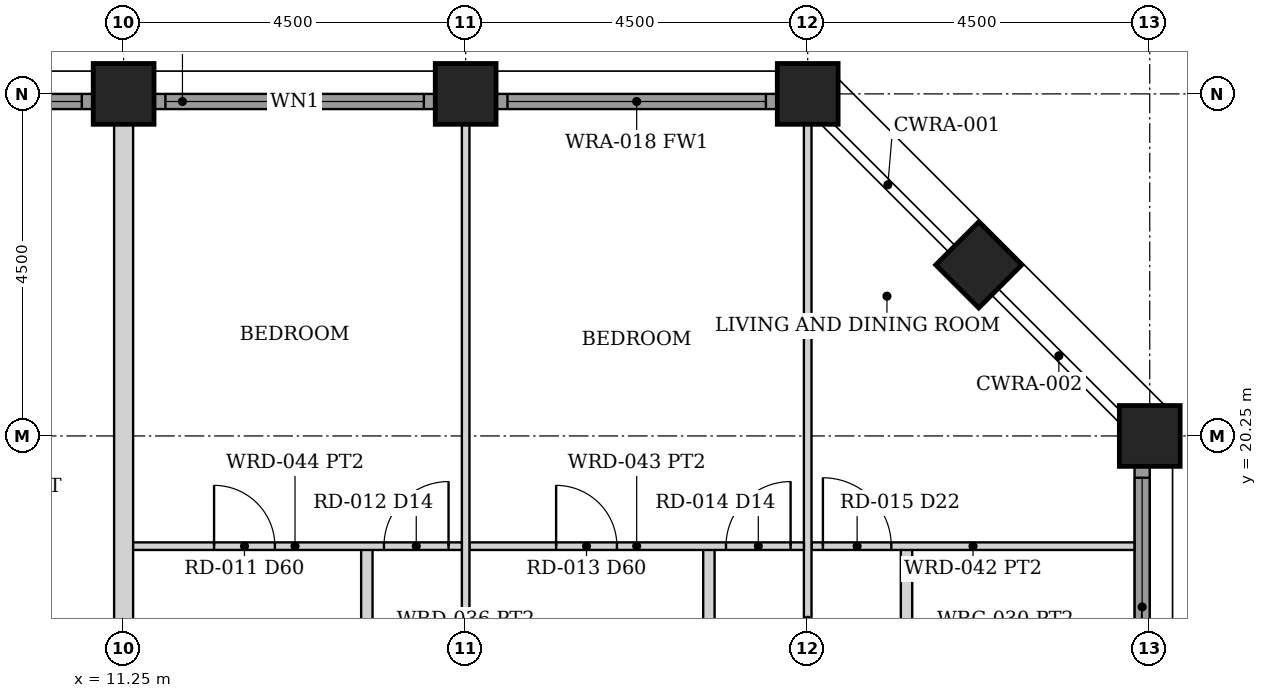
"""IFC4 building model, lengths in metres.
Left out: names, types, materials, properties, quantities, classifications, styles, units other than length and angle.
Written with IfcOpenShell. Run it as: python <this file> out.ifc"""

import sys

from ifc_helpers import new_model, si_unit, direction, frame, frame_2d, origin, origin_2d, place, context, subcontext, project, spatial, rectangle, hollow_rectangle, extrude, element, fill, save


model = new_model("IFC4")
c1 = context("Model", 3, precision=1e-05, world=origin(), true_north=direction((0.0, 1.0)))
c2 = subcontext(c1, "Body", "Model", "MODEL_VIEW")
j1 = project(units=[si_unit("LENGTHUNIT", "METRE"), si_unit("PLANEANGLEUNIT", "RADIAN")], contexts=[c1])
p1 = place(None, origin())
s1 = spatial("IfcSite", under=j1, at=p1, CompositionType="ELEMENT")
p2 = place(p1, origin())
s2 = spatial("IfcBuilding", under=s1, at=p2, CompositionType="ELEMENT")
p3 = place(p2, frame((0.0, 0.0, 58.0)))
s3 = spatial("IfcBuildingStorey", under=s2, at=p3, CompositionType="ELEMENT", Elevation=58.0)
for number, where, z_axis, x_axis in (
    (1, (11.25, 24.75, 0.0), (0.0, 0.0, 1.0), (0.0, 1.0, 0.0)),
    (2, (15.75, 24.75, 0.0), (0.0, 0.0, 1.0), (0.0, 1.0, 0.0)),
    (3, (20.25, 24.75, 0.0), (0.0, 0.0, 1.0), (0.0, 1.0, 0.0)),
    (4, (24.75, 20.25, 0.0), (0.0, 0.0, 1.0), (1.0, 0.0, 0.0)),
    (5, (22.5, 22.5, 0.0), (0.0, 0.0, 1.0), (0.707, 0.707, 0.0)),
):
    element("IfcColumn", number, at=place(p3, frame(where, z_axis=z_axis, x_axis=x_axis)), inside=s3, PredefinedType="COLUMN", context=c2, shape_type="SweptSolid", body=[
        extrude(hollow_rectangle(XDim=0.8, YDim=0.8, WallThickness=0.06, at=origin_2d()), origin(), (0.0, 0.0, 1.0), 3.5),
    ])
p4 = place(p3, frame((24.65, 16.155, 0.0), z_axis=(0.0, 0.0, 1.0), x_axis=(0.0, 1.0, 0.0)))
e6 = element("IfcWall", 6, at=p4, inside=s3, PredefinedType="SOLIDWALL", context=c2, shape_type="SweptSolid", body=[
    extrude(rectangle(XDim=3.69, YDim=0.2, at=frame_2d((1.845, 0.0))), origin(), (0.0, 0.0, 1.0), 2.379),
])
p5 = place(p4, frame((0.145, 0.0, 0.3)))
e7 = element("IfcOpeningElement", 7, at=p5, cuts=e6, PredefinedType="OPENING", context=c2, shape_type="SweptSolid", body=[
    extrude(rectangle(XDim=3.4, YDim=1.929, at=frame_2d((1.7, 0.964))), frame((0.0, 0.11, 0.0), z_axis=(0.0, -1.0, 0.0), x_axis=(1.0, 0.0, 0.0)), (0.0, 0.0, 1.0), 0.22),
])
p6 = place(p3, frame((7.155, 24.65, 0.0), z_axis=(0.0, 0.0, 1.0), x_axis=(1.0, 0.0, 0.0)))
e8 = element("IfcWall", 8, at=p6, inside=s3, PredefinedType="SOLIDWALL", context=c2, shape_type="SweptSolid", body=[
    extrude(rectangle(XDim=3.69, YDim=0.2, at=frame_2d((1.845, 0.0))), origin(), (0.0, 0.0, 1.0), 2.379),
])
p7 = place(p6, frame((0.145, 0.0, 0.3)))
e9 = element("IfcOpeningElement", 9, at=p7, cuts=e8, PredefinedType="OPENING", context=c2, shape_type="SweptSolid", body=[
    extrude(rectangle(XDim=3.4, YDim=1.929, at=frame_2d((1.7, 0.964))), frame((0.0, 0.11, 0.0), z_axis=(0.0, -1.0, 0.0), x_axis=(1.0, 0.0, 0.0)), (0.0, 0.0, 1.0), 0.22),
])
p8 = place(p3, frame((11.655, 24.65, 0.0), z_axis=(0.0, 0.0, 1.0), x_axis=(1.0, 0.0, 0.0)))
e10 = element("IfcWall", 10, at=p8, inside=s3, PredefinedType="SOLIDWALL", context=c2, shape_type="SweptSolid", body=[
    extrude(rectangle(XDim=3.69, YDim=0.2, at=frame_2d((1.845, 0.0))), origin(), (0.0, 0.0, 1.0), 2.379),
])
p9 = place(p8, frame((0.145, 0.0, 0.3)))
e11 = element("IfcOpeningElement", 11, at=p9, cuts=e10, PredefinedType="OPENING", context=c2, shape_type="SweptSolid", body=[
    extrude(rectangle(XDim=3.4, YDim=1.929, at=frame_2d((1.7, 0.964))), frame((0.0, 0.11, 0.0), z_axis=(0.0, -1.0, 0.0), x_axis=(1.0, 0.0, 0.0)), (0.0, 0.0, 1.0), 0.22),
])
p10 = place(p3, frame((16.155, 24.65, 0.0), z_axis=(0.0, 0.0, 1.0), x_axis=(1.0, 0.0, 0.0)))
e12 = element("IfcWall", 12, at=p10, inside=s3, PredefinedType="SOLIDWALL", context=c2, shape_type="SweptSolid", body=[
    extrude(rectangle(XDim=3.69, YDim=0.2, at=frame_2d((1.845, 0.0))), origin(), (0.0, 0.0, 1.0), 2.379),
])
p11 = place(p10, frame((0.145, 0.0, 0.3)))
e13 = element("IfcOpeningElement", 13, at=p11, cuts=e12, PredefinedType="OPENING", context=c2, shape_type="SweptSolid", body=[
    extrude(rectangle(XDim=3.4, YDim=1.929, at=frame_2d((1.7, 0.964))), frame((0.0, 0.11, 0.0), z_axis=(0.0, -1.0, 0.0), x_axis=(1.0, 0.0, 0.0)), (0.0, 0.0, 1.0), 0.22),
])
p12 = place(p3, frame((21.55, 11.3, 0.0), z_axis=(0.0, 0.0, 1.0), x_axis=(0.0, 1.0, 0.0)))
e14 = element("IfcWall", 14, at=p12, inside=s3, PredefinedType="PARTITIONING", context=c2, shape_type="SweptSolid", body=[
    extrude(rectangle(XDim=7.5, YDim=0.15, at=frame_2d((3.75, 0.0))), origin(), (0.0, 0.0, 1.0), 2.373),
])
p13 = place(p12, frame((3.3, 0.0, 0.0)))
e15 = element("IfcOpeningElement", 15, at=p13, cuts=e14, PredefinedType="OPENING", context=c2, shape_type="SweptSolid", body=[
    extrude(rectangle(XDim=0.9, YDim=2.1, at=frame_2d((0.45, 1.05))), frame((0.0, 0.085, 0.0), z_axis=(0.0, -1.0, 0.0), x_axis=(1.0, 0.0, 0.0)), (0.0, 0.0, 1.0), 0.17),
])
p14 = place(p3, frame((20.3, 18.8, 0.0), z_axis=(0.0, 0.0, 1.0), x_axis=(1.0, 0.0, 0.0)))
e16 = element("IfcWall", 16, at=p14, inside=s3, PredefinedType="PARTITIONING", context=c2, shape_type="SweptSolid", body=[
    extrude(rectangle(XDim=4.25, YDim=0.1, at=frame_2d((2.125, 0.0))), origin(), (0.0, 0.0, 1.0), 2.373),
])
p15 = place(p14, frame((0.15, 0.0, 0.0)))
e17 = element("IfcOpeningElement", 17, at=p15, cuts=e16, PredefinedType="OPENING", context=c2, shape_type="SweptSolid", body=[
    extrude(rectangle(XDim=0.9, YDim=2.1, at=frame_2d((0.45, 1.05))), frame((0.0, 0.06, 0.0), z_axis=(0.0, -1.0, 0.0), x_axis=(1.0, 0.0, 0.0)), (0.0, 0.0, 1.0), 0.12),
])
p16 = place(p3, frame((20.25, 11.3, 0.0), z_axis=(0.0, 0.0, 1.0), x_axis=(0.0, 1.0, 0.0)))
e18 = element("IfcWall", 18, at=p16, inside=s3, PredefinedType="PARTITIONING", context=c2, shape_type="SweptSolid", body=[
    extrude(rectangle(XDim=13.05, YDim=0.1, at=frame_2d((6.525, 0.0))), origin(), (0.0, 0.0, 1.0), 2.373),
])
p17 = place(p3, frame((18.95, 11.3, 0.0), z_axis=(0.0, 0.0, 1.0), x_axis=(0.0, 1.0, 0.0)))
e19 = element("IfcWall", 19, at=p17, inside=s3, PredefinedType="PARTITIONING", context=c2, shape_type="SweptSolid", body=[
    extrude(rectangle(XDim=7.5, YDim=0.15, at=frame_2d((3.75, 0.0))), origin(), (0.0, 0.0, 1.0), 2.373),
])
p18 = place(p17, frame((0.85, 0.0, 0.0)))
e20 = element("IfcOpeningElement", 20, at=p18, cuts=e19, PredefinedType="OPENING", context=c2, shape_type="SweptSolid", body=[
    extrude(rectangle(XDim=0.9, YDim=2.1, at=frame_2d((0.45, 1.05))), frame((0.0, 0.085, 0.0), z_axis=(0.0, -1.0, 0.0), x_axis=(1.0, 0.0, 0.0)), (0.0, 0.0, 1.0), 0.17),
])
p19 = place(p3, frame((15.8, 18.8, 0.0), z_axis=(0.0, 0.0, 1.0), x_axis=(1.0, 0.0, 0.0)))
e21 = element("IfcWall", 21, at=p19, inside=s3, PredefinedType="PARTITIONING", context=c2, shape_type="SweptSolid", body=[
    extrude(rectangle(XDim=4.4, YDim=0.1, at=frame_2d((2.2, 0.0))), origin(), (0.0, 0.0, 1.0), 2.373),
])
p20 = place(p19, frame((3.375, 0.0, 0.0)))
e22 = element("IfcOpeningElement", 22, at=p20, cuts=e21, PredefinedType="OPENING", context=c2, shape_type="SweptSolid", body=[
    extrude(rectangle(XDim=0.85, YDim=2.1, at=frame_2d((0.425, 1.05))), frame((0.0, 0.06, 0.0), z_axis=(0.0, -1.0, 0.0), x_axis=(1.0, 0.0, 0.0)), (0.0, 0.0, 1.0), 0.12),
])
p21 = place(p19, frame((1.14, 0.0, 0.0)))
e23 = element("IfcOpeningElement", 23, at=p21, cuts=e21, PredefinedType="OPENING", context=c2, shape_type="SweptSolid", body=[
    extrude(rectangle(XDim=0.8, YDim=2.1, at=frame_2d((0.4, 1.05))), frame((0.0, 0.06, 0.0), z_axis=(0.0, -1.0, 0.0), x_axis=(1.0, 0.0, 0.0)), (0.0, 0.0, 1.0), 0.12),
])
p22 = place(p3, frame((15.75, 11.3, 0.0), z_axis=(0.0, 0.0, 1.0), x_axis=(0.0, 1.0, 0.0)))
e24 = element("IfcWall", 24, at=p22, inside=s3, PredefinedType="PARTITIONING", context=c2, shape_type="SweptSolid", body=[
    extrude(rectangle(XDim=13.05, YDim=0.1, at=frame_2d((6.525, 0.0))), origin(), (0.0, 0.0, 1.0), 2.373),
])
p23 = place(p3, frame((14.45, 11.3, 0.0), z_axis=(0.0, 0.0, 1.0), x_axis=(0.0, 1.0, 0.0)))
e25 = element("IfcWall", 25, at=p23, inside=s3, PredefinedType="PARTITIONING", context=c2, shape_type="SweptSolid", body=[
    extrude(rectangle(XDim=7.5, YDim=0.15, at=frame_2d((3.75, 0.0))), origin(), (0.0, 0.0, 1.0), 2.373),
])
p24 = place(p23, frame((0.85, 0.0, 0.0)))
e26 = element("IfcOpeningElement", 26, at=p24, cuts=e25, PredefinedType="OPENING", context=c2, shape_type="SweptSolid", body=[
    extrude(rectangle(XDim=0.9, YDim=2.1, at=frame_2d((0.45, 1.05))), frame((0.0, 0.085, 0.0), z_axis=(0.0, -1.0, 0.0), x_axis=(1.0, 0.0, 0.0)), (0.0, 0.0, 1.0), 0.17),
])
p25 = place(p3, frame((11.31, 18.8, 0.0), z_axis=(0.0, 0.0, 1.0), x_axis=(1.0, 0.0, 0.0)))
e27 = element("IfcWall", 27, at=p25, inside=s3, PredefinedType="PARTITIONING", context=c2, shape_type="SweptSolid", body=[
    extrude(rectangle(XDim=4.39, YDim=0.1, at=frame_2d((2.195, 0.0))), origin(), (0.0, 0.0, 1.0), 2.373),
])
p26 = place(p25, frame((3.365, 0.0, 0.0)))
e28 = element("IfcOpeningElement", 28, at=p26, cuts=e27, PredefinedType="OPENING", context=c2, shape_type="SweptSolid", body=[
    extrude(rectangle(XDim=0.85, YDim=2.1, at=frame_2d((0.425, 1.05))), frame((0.0, 0.06, 0.0), z_axis=(0.0, -1.0, 0.0), x_axis=(1.0, 0.0, 0.0)), (0.0, 0.0, 1.0), 0.12),
])
p27 = place(p25, frame((1.13, 0.0, 0.0)))
e29 = element("IfcOpeningElement", 29, at=p27, cuts=e27, PredefinedType="OPENING", context=c2, shape_type="SweptSolid", body=[
    extrude(rectangle(XDim=0.8, YDim=2.1, at=frame_2d((0.4, 1.05))), frame((0.0, 0.06, 0.0), z_axis=(0.0, -1.0, 0.0), x_axis=(1.0, 0.0, 0.0)), (0.0, 0.0, 1.0), 0.12),
])
p28 = place(p3, frame((11.25, 9.2, 0.0), z_axis=(0.0, 0.0, 1.0), x_axis=(0.0, 1.0, 0.0)))
e30 = element("IfcWall", 30, at=p28, inside=s3, PredefinedType="PARTITIONING", context=c2, shape_type="SweptSolid", body=[
    extrude(rectangle(XDim=15.15, YDim=0.25, at=frame_2d((7.575, 0.0))), origin(), (0.0, 0.0, 1.0), 2.373),
])
p29 = place(p5, origin())
e31 = element("IfcWindow", 31, at=p29, inside=s3, PartitioningType="SINGLE_PANEL", PredefinedType="WINDOW", context=c2, shape_type="SweptSolid", body=[
    extrude(rectangle(XDim=3.4, YDim=1.929, at=frame_2d((1.7, 0.964))), frame((0.0, 0.03, 0.0), z_axis=(0.0, -1.0, 0.0), x_axis=(1.0, 0.0, 0.0)), (0.0, 0.0, 1.0), 0.06),
])
fill(e7, e31)
p30 = place(p7, origin())
e32 = element("IfcWindow", 32, at=p30, inside=s3, PartitioningType="SINGLE_PANEL", PredefinedType="WINDOW", context=c2, shape_type="SweptSolid", body=[
    extrude(rectangle(XDim=3.4, YDim=1.929, at=frame_2d((1.7, 0.964))), frame((0.0, 0.03, 0.0), z_axis=(0.0, -1.0, 0.0), x_axis=(1.0, 0.0, 0.0)), (0.0, 0.0, 1.0), 0.06),
])
fill(e9, e32)
p31 = place(p9, origin())
e33 = element("IfcWindow", 33, at=p31, inside=s3, PartitioningType="SINGLE_PANEL", PredefinedType="WINDOW", context=c2, shape_type="SweptSolid", body=[
    extrude(rectangle(XDim=3.4, YDim=1.929, at=frame_2d((1.7, 0.964))), frame((0.0, 0.03, 0.0), z_axis=(0.0, -1.0, 0.0), x_axis=(1.0, 0.0, 0.0)), (0.0, 0.0, 1.0), 0.06),
])
fill(e11, e33)
p32 = place(p11, origin())
e34 = element("IfcWindow", 34, at=p32, inside=s3, PartitioningType="SINGLE_PANEL", PredefinedType="WINDOW", context=c2, shape_type="SweptSolid", body=[
    extrude(rectangle(XDim=3.4, YDim=1.929, at=frame_2d((1.7, 0.964))), frame((0.0, 0.03, 0.0), z_axis=(0.0, -1.0, 0.0), x_axis=(1.0, 0.0, 0.0)), (0.0, 0.0, 1.0), 0.06),
])
fill(e13, e34)
p33 = place(p15, origin())
e35 = element("IfcDoor", 35, at=p33, inside=s3, OperationType="SINGLE_SWING_LEFT", PredefinedType="DOOR", context=c2, shape_type="SweptSolid", body=[
    extrude(rectangle(XDim=0.9, YDim=2.1, at=frame_2d((0.45, 1.05))), frame((0.0, 0.025, 0.0), z_axis=(0.0, -1.0, 0.0), x_axis=(1.0, 0.0, 0.0)), (0.0, 0.0, 1.0), 0.05),
])
fill(e17, e35)
p34 = place(p20, origin())
e36 = element("IfcDoor", 36, at=p34, inside=s3, OperationType="SINGLE_SWING_RIGHT", PredefinedType="DOOR", context=c2, shape_type="SweptSolid", body=[
    extrude(rectangle(XDim=0.85, YDim=2.1, at=frame_2d((0.425, 1.05))), frame((0.0, 0.025, 0.0), z_axis=(0.0, -1.0, 0.0), x_axis=(1.0, 0.0, 0.0)), (0.0, 0.0, 1.0), 0.05),
])
fill(e22, e36)
p35 = place(p21, origin())
e37 = element("IfcDoor", 37, at=p35, inside=s3, OperationType="SINGLE_SWING_LEFT", PredefinedType="DOOR", context=c2, shape_type="SweptSolid", body=[
    extrude(rectangle(XDim=0.8, YDim=2.1, at=frame_2d((0.4, 1.05))), frame((0.0, 0.025, 0.0), z_axis=(0.0, -1.0, 0.0), x_axis=(1.0, 0.0, 0.0)), (0.0, 0.0, 1.0), 0.05),
])
fill(e23, e37)
p36 = place(p26, origin())
e38 = element("IfcDoor", 38, at=p36, inside=s3, OperationType="SINGLE_SWING_RIGHT", PredefinedType="DOOR", context=c2, shape_type="SweptSolid", body=[
    extrude(rectangle(XDim=0.85, YDim=2.1, at=frame_2d((0.425, 1.05))), frame((0.0, 0.025, 0.0), z_axis=(0.0, -1.0, 0.0), x_axis=(1.0, 0.0, 0.0)), (0.0, 0.0, 1.0), 0.05),
])
fill(e28, e38)
p37 = place(p27, origin())
e39 = element("IfcDoor", 39, at=p37, inside=s3, OperationType="SINGLE_SWING_LEFT", PredefinedType="DOOR", context=c2, shape_type="SweptSolid", body=[
    extrude(rectangle(XDim=0.8, YDim=2.1, at=frame_2d((0.4, 1.05))), frame((0.0, 0.025, 0.0), z_axis=(0.0, -1.0, 0.0), x_axis=(1.0, 0.0, 0.0)), (0.0, 0.0, 1.0), 0.05),
])
fill(e29, e39)
save(model, sys.argv[1])
